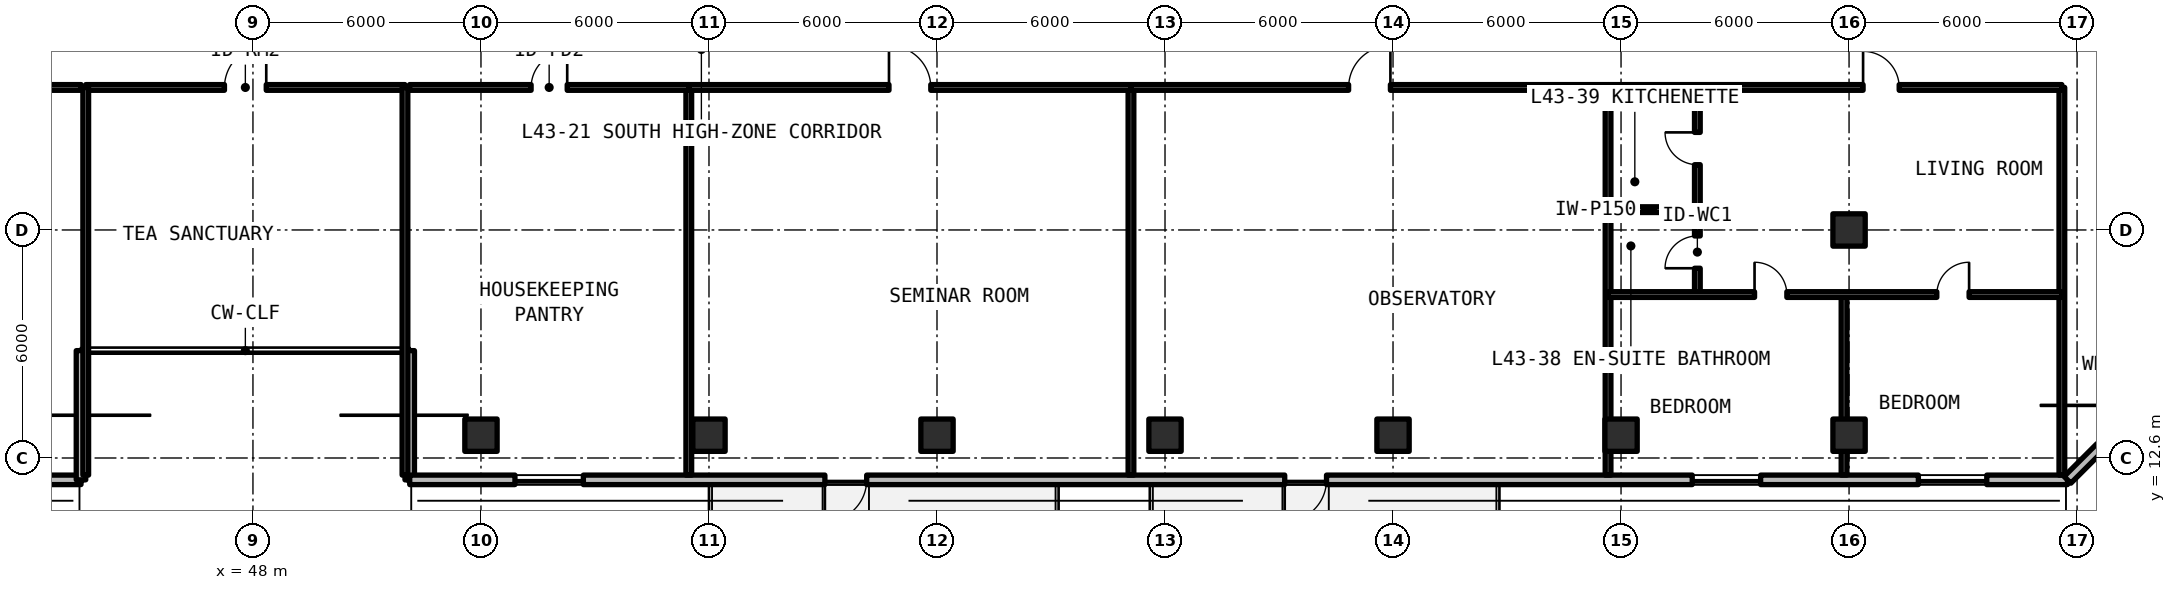
"""IFC4 building model, lengths in metres.
Left out: names, types, materials, properties, quantities, classifications, styles, units other than length and angle.
Written with IfcOpenShell. Run it as: python <this file> out.ifc"""

import sys

from ifc_helpers import new_model, si_unit, direction, frame, frame_2d, origin, origin_2d, place, context, subcontext, project, spatial, rectangle, extrude, element, fill, save


model = new_model("IFC4")
c1 = context("Model", 3, precision=1e-05, world=origin(), true_north=direction((0.0, 1.0)))
c2 = subcontext(c1, "Body", "Model", "MODEL_VIEW")
j1 = project(units=[si_unit("LENGTHUNIT", "METRE"), si_unit("PLANEANGLEUNIT", "RADIAN")], contexts=[c1])
p1 = place(None, origin())
s1 = spatial("IfcSite", under=j1, at=p1, CompositionType="ELEMENT")
p2 = place(p1, origin())
s2 = spatial("IfcBuilding", under=s1, at=p2, CompositionType="ELEMENT")
p3 = place(p2, frame((0.0, 0.0, 155.1)))
s3 = spatial("IfcBuildingStorey", under=s2, at=p3, CompositionType="ELEMENT", Elevation=155.1)
for number, where, z_axis, x_axis in (
    (1, (90.0, 18.6, 0.0), (0.0, 0.0, 1.0), (1.0, 0.0, 0.0)),
    (2, (54.0, 13.2, 0.0), (0.0, 0.0, 1.0), (1.0, 0.0, 0.0)),
    (3, (60.0, 13.2, 0.0), (0.0, 0.0, 1.0), (1.0, 0.0, 0.0)),
    (4, (66.0, 13.2, 0.0), (0.0, 0.0, 1.0), (1.0, 0.0, 0.0)),
    (5, (72.0, 13.2, 0.0), (0.0, 0.0, 1.0), (1.0, 0.0, 0.0)),
    (6, (78.0, 13.2, 0.0), (0.0, 0.0, 1.0), (1.0, 0.0, 0.0)),
    (7, (84.0, 13.2, 0.0), (0.0, 0.0, 1.0), (1.0, 0.0, 0.0)),
    (8, (90.0, 13.2, 0.0), (0.0, 0.0, 1.0), (1.0, 0.0, 0.0)),
):
    element("IfcColumn", number, at=place(p3, frame(where, z_axis=z_axis, x_axis=x_axis)), inside=s3, PredefinedType="COLUMN", context=c2, shape_type="SweptSolid", body=[
        extrude(rectangle(XDim=0.85, YDim=0.85, at=origin_2d()), origin(), (0.0, 0.0, 1.0), 3.3),
    ])
p4 = place(p3, frame((23.852, 12.025, 0.0), z_axis=(0.0, 0.0, 1.0), x_axis=(1.0, 0.0, 0.0)))
e9 = element("IfcWall", 9, at=p4, inside=s3, PredefinedType="SOLIDWALL", context=c2, shape_type="SweptSolid", body=[
    extrude(rectangle(XDim=19.623, YDim=0.25, at=frame_2d((9.812, 0.0))), origin(), (0.0, 0.0, 1.0), 3.08),
])
p5 = place(p4, frame((3.148, 0.0, 0.0)))
e10 = element("IfcOpeningElement", 10, at=p5, cuts=e9, PredefinedType="OPENING", context=c2, shape_type="SweptSolid", body=[
    extrude(rectangle(XDim=1.1, YDim=2.15, at=frame_2d((0.55, 1.075))), frame((0.0, 0.135, 0.0), z_axis=(0.0, -1.0, 0.0), x_axis=(1.0, 0.0, 0.0)), (0.0, 0.0, 1.0), 0.27),
])
p6 = place(p4, frame((14.024, 0.0, 0.78)))
e11 = element("IfcOpeningElement", 11, at=p6, cuts=e9, PredefinedType="OPENING", context=c2, shape_type="SweptSolid", body=[
    extrude(rectangle(XDim=1.8, YDim=1.66, at=frame_2d((0.9, 0.83))), frame((0.0, 0.135, 0.0), z_axis=(0.0, -1.0, 0.0), x_axis=(1.0, 0.0, 0.0)), (0.0, 0.0, 1.0), 0.27),
])
for number, where, z_axis, x_axis in (
    (12, (43.475, 12.025, 0.0), (0.0, 0.0, 1.0), (0.0, 1.0, 0.0)),
    (13, (52.125, 15.425, 0.0), (0.0, 0.0, 1.0), (0.0, -1.0, 0.0)),
):
    element("IfcWall", number, at=place(p3, frame(where, z_axis=z_axis, x_axis=x_axis)), inside=s3, PredefinedType="SOLIDWALL", context=c2, shape_type="SweptSolid", body=[
        extrude(rectangle(XDim=3.4, YDim=0.25, at=frame_2d((1.7, 0.0))), origin(), (0.0, 0.0, 1.0), 3.08),
    ])
p7 = place(p3, frame((52.125, 12.025, 0.0), z_axis=(0.0, 0.0, 1.0), x_axis=(1.0, 0.0, 0.0)))
e14 = element("IfcWall", 14, at=p7, inside=s3, PredefinedType="SOLIDWALL", context=c2, shape_type="SweptSolid", body=[
    extrude(rectangle(XDim=43.623, YDim=0.25, at=frame_2d((21.812, 0.0))), origin(), (0.0, 0.0, 1.0), 3.08),
])
p8 = place(p7, frame((10.925, 0.0, 0.0)))
e15 = element("IfcOpeningElement", 15, at=p8, cuts=e14, PredefinedType="OPENING", context=c2, shape_type="SweptSolid", body=[
    extrude(rectangle(XDim=1.1, YDim=2.15, at=frame_2d((0.55, 1.075))), frame((0.0, 0.135, 0.0), z_axis=(0.0, -1.0, 0.0), x_axis=(1.0, 0.0, 0.0)), (0.0, 0.0, 1.0), 0.27),
])
p9 = place(p7, frame((23.025, 0.0, 0.0)))
e16 = element("IfcOpeningElement", 16, at=p9, cuts=e14, PredefinedType="OPENING", context=c2, shape_type="SweptSolid", body=[
    extrude(rectangle(XDim=1.1, YDim=2.15, at=frame_2d((0.55, 1.075))), frame((0.0, 0.135, 0.0), z_axis=(0.0, -1.0, 0.0), x_axis=(1.0, 0.0, 0.0)), (0.0, 0.0, 1.0), 0.27),
])
p10 = place(p7, frame((2.769, 0.0, 0.78)))
e17 = element("IfcOpeningElement", 17, at=p10, cuts=e14, PredefinedType="OPENING", context=c2, shape_type="SweptSolid", body=[
    extrude(rectangle(XDim=1.8, YDim=1.66, at=frame_2d((0.9, 0.83))), frame((0.0, 0.135, 0.0), z_axis=(0.0, -1.0, 0.0), x_axis=(1.0, 0.0, 0.0)), (0.0, 0.0, 1.0), 0.27),
])
p11 = place(p7, frame((33.748, 0.0, 0.78)))
e18 = element("IfcOpeningElement", 18, at=p11, cuts=e14, PredefinedType="OPENING", context=c2, shape_type="SweptSolid", body=[
    extrude(rectangle(XDim=1.8, YDim=1.66, at=frame_2d((0.9, 0.83))), frame((0.0, 0.135, 0.0), z_axis=(0.0, -1.0, 0.0), x_axis=(1.0, 0.0, 0.0)), (0.0, 0.0, 1.0), 0.27),
])
p12 = place(p7, frame((39.699, 0.0, 0.78)))
e19 = element("IfcOpeningElement", 19, at=p12, cuts=e14, PredefinedType="OPENING", context=c2, shape_type="SweptSolid", body=[
    extrude(rectangle(XDim=1.8, YDim=1.66, at=frame_2d((0.9, 0.83))), frame((0.0, 0.135, 0.0), z_axis=(0.0, -1.0, 0.0), x_axis=(1.0, 0.0, 0.0)), (0.0, 0.0, 1.0), 0.27),
])
p13 = place(p3, frame((95.748, 12.025, 0.0), z_axis=(0.0, 0.0, 1.0), x_axis=(0.70708586489, 0.707127696864, 0.0)))
e20 = element("IfcWall", 20, at=p13, inside=s3, PredefinedType="SOLIDWALL", context=c2, shape_type="SweptSolid", body=[
    extrude(rectangle(XDim=5.836, YDim=0.25, at=frame_2d((2.918, 0.0))), origin(), (0.0, 0.0, 1.0), 3.08),
])
p14 = place(p13, frame((1.218, 0.0, 0.78)))
e21 = element("IfcOpeningElement", 21, at=p14, cuts=e20, PredefinedType="OPENING", context=c2, shape_type="SweptSolid", body=[
    extrude(rectangle(XDim=3.4, YDim=1.66, at=frame_2d((1.7, 0.83))), frame((0.0, 0.135, 0.0), z_axis=(0.0, -1.0, 0.0), x_axis=(1.0, 0.0, 0.0)), (0.0, 0.0, 1.0), 0.27),
])
p15 = place(p3, frame((43.6, 22.35, 0.0), z_axis=(0.0, 0.0, 1.0), x_axis=(1.0, 0.0, 0.0)))
e22 = element("IfcWall", 22, at=p15, inside=s3, PredefinedType="SOLIDWALL", context=c2, shape_type="SweptSolid", body=[
    extrude(rectangle(XDim=8.4, YDim=0.15, at=frame_2d((4.2, 0.0))), origin(), (0.0, 0.0, 1.0), 2.35),
])
p16 = place(p15, frame((3.65, 0.0, 0.0)))
e23 = element("IfcOpeningElement", 23, at=p16, cuts=e22, PredefinedType="OPENING", context=c2, shape_type="SweptSolid", body=[
    extrude(rectangle(XDim=1.1, YDim=2.15, at=frame_2d((0.55, 1.075))), frame((0.0, 0.085, 0.0), z_axis=(0.0, -1.0, 0.0), x_axis=(1.0, 0.0, 0.0)), (0.0, 0.0, 1.0), 0.17),
])
for number, where, z_axis, x_axis in (
    (24, (43.6, 12.15, 0.0), (0.0, 0.0, 1.0), (0.0, 1.0, 0.0)),
    (25, (52.0, 12.15, 0.0), (0.0, 0.0, 1.0), (0.0, 1.0, 0.0)),
):
    element("IfcWall", number, at=place(p3, frame(where, z_axis=z_axis, x_axis=x_axis)), inside=s3, PredefinedType="SOLIDWALL", context=c2, shape_type="SweptSolid", body=[
        extrude(rectangle(XDim=10.2, YDim=0.15, at=frame_2d((5.1, 0.0))), origin(), (0.0, 0.0, 1.0), 2.35),
    ])
p17 = place(p3, frame((34.072, 22.35, 0.0), z_axis=(0.0, 0.0, 1.0), x_axis=(1.0, 0.0, 0.0)))
e26 = element("IfcWall", 26, at=p17, inside=s3, PredefinedType="SOLIDWALL", context=c2, shape_type="SweptSolid", body=[
    extrude(rectangle(XDim=9.408, YDim=0.15, at=frame_2d((4.704, 0.0))), origin(), (0.0, 0.0, 1.0), 2.35),
])
p18 = place(p17, frame((4.154, 0.0, 0.0)))
e27 = element("IfcOpeningElement", 27, at=p18, cuts=e26, PredefinedType="OPENING", context=c2, shape_type="SweptSolid", body=[
    extrude(rectangle(XDim=1.1, YDim=2.15, at=frame_2d((0.55, 1.075))), frame((0.0, 0.085, 0.0), z_axis=(0.0, -1.0, 0.0), x_axis=(1.0, 0.0, 0.0)), (0.0, 0.0, 1.0), 0.17),
])
for number, where, z_axis, x_axis in (
    (28, (95.6, 12.15, 0.0), (0.0, 0.0, 1.0), (0.0, 1.0, 0.0)),
    (29, (59.469, 12.15, 0.0), (0.0, 0.0, 1.0), (0.0, 1.0, 0.0)),
):
    element("IfcWall", number, at=place(p3, frame(where, z_axis=z_axis, x_axis=x_axis)), inside=s3, PredefinedType="SOLIDWALL", context=c2, shape_type="SweptSolid", body=[
        extrude(rectangle(XDim=10.2, YDim=0.15, at=frame_2d((5.1, 0.0))), origin(), (0.0, 0.0, 1.0), 2.35),
    ])
p19 = place(p3, frame((52.12, 22.35, 0.0), z_axis=(0.0, 0.0, 1.0), x_axis=(1.0, 0.0, 0.0)))
e30 = element("IfcWall", 30, at=p19, inside=s3, PredefinedType="SOLIDWALL", context=c2, shape_type="SweptSolid", body=[
    extrude(rectangle(XDim=7.349, YDim=0.15, at=frame_2d((3.674, 0.0))), origin(), (0.0, 0.0, 1.0), 2.35),
])
p20 = place(p19, frame((3.199, 0.0, 0.0)))
e31 = element("IfcOpeningElement", 31, at=p20, cuts=e30, PredefinedType="OPENING", context=c2, shape_type="SweptSolid", body=[
    extrude(rectangle(XDim=0.95, YDim=2.15, at=frame_2d((0.475, 1.075))), frame((0.0, 0.085, 0.0), z_axis=(0.0, -1.0, 0.0), x_axis=(1.0, 0.0, 0.0)), (0.0, 0.0, 1.0), 0.17),
])
p21 = place(p3, frame((71.104, 12.15, 0.0), z_axis=(0.0, 0.0, 1.0), x_axis=(0.0, 1.0, 0.0)))
e32 = element("IfcWall", 32, at=p21, inside=s3, PredefinedType="SOLIDWALL", context=c2, shape_type="SweptSolid", body=[
    extrude(rectangle(XDim=10.2, YDim=0.15, at=frame_2d((5.1, 0.0))), origin(), (0.0, 0.0, 1.0), 2.35),
])
p22 = place(p3, frame((59.469, 22.35, 0.0), z_axis=(0.0, 0.0, 1.0), x_axis=(1.0, 0.0, 0.0)))
e33 = element("IfcWall", 33, at=p22, inside=s3, PredefinedType="SOLIDWALL", context=c2, shape_type="SweptSolid", body=[
    extrude(rectangle(XDim=11.635, YDim=0.15, at=frame_2d((5.818, 0.0))), origin(), (0.0, 0.0, 1.0), 2.35),
])
p23 = place(p22, frame((5.268, 0.0, 0.0)))
e34 = element("IfcOpeningElement", 34, at=p23, cuts=e33, PredefinedType="OPENING", context=c2, shape_type="SweptSolid", body=[
    extrude(rectangle(XDim=1.1, YDim=2.15, at=frame_2d((0.55, 1.075))), frame((0.0, 0.085, 0.0), z_axis=(0.0, -1.0, 0.0), x_axis=(1.0, 0.0, 0.0)), (0.0, 0.0, 1.0), 0.17),
])
p24 = place(p3, frame((83.658, 12.15, 0.0), z_axis=(0.0, 0.0, 1.0), x_axis=(0.0, 1.0, 0.0)))
e35 = element("IfcWall", 35, at=p24, inside=s3, PredefinedType="SOLIDWALL", context=c2, shape_type="SweptSolid", body=[
    extrude(rectangle(XDim=10.2, YDim=0.15, at=frame_2d((5.1, 0.0))), origin(), (0.0, 0.0, 1.0), 2.35),
])
p25 = place(p3, frame((71.104, 22.35, 0.0), z_axis=(0.0, 0.0, 1.0), x_axis=(1.0, 0.0, 0.0)))
e36 = element("IfcWall", 36, at=p25, inside=s3, PredefinedType="SOLIDWALL", context=c2, shape_type="SweptSolid", body=[
    extrude(rectangle(XDim=12.554, YDim=0.15, at=frame_2d((6.277, 0.0))), origin(), (0.0, 0.0, 1.0), 2.35),
])
p26 = place(p25, frame((5.727, 0.0, 0.0)))
e37 = element("IfcOpeningElement", 37, at=p26, cuts=e36, PredefinedType="OPENING", context=c2, shape_type="SweptSolid", body=[
    extrude(rectangle(XDim=1.1, YDim=2.15, at=frame_2d((0.55, 1.075))), frame((0.0, 0.085, 0.0), z_axis=(0.0, -1.0, 0.0), x_axis=(1.0, 0.0, 0.0)), (0.0, 0.0, 1.0), 0.17),
])
p27 = place(p3, frame((83.658, 19.135, 0.0), z_axis=(0.0, 0.0, 1.0), x_axis=(1.0, 0.0, 0.0)))
e38 = element("IfcWall", 38, at=p27, inside=s3, PredefinedType="PARTITIONING", context=c2, shape_type="SweptSolid", body=[
    extrude(rectangle(XDim=2.35, YDim=0.15, at=frame_2d((1.175, 0.0))), origin(), (0.0, 0.0, 1.0), 2.35),
])
p28 = place(p3, frame((86.008, 16.901, 0.0), z_axis=(0.0, 0.0, 1.0), x_axis=(0.0, 1.0, 0.0)))
e39 = element("IfcWall", 39, at=p28, inside=s3, PredefinedType="PARTITIONING", context=c2, shape_type="SweptSolid", body=[
    extrude(rectangle(XDim=5.449, YDim=0.15, at=frame_2d((2.725, 0.0))), origin(), (0.0, 0.0, 1.0), 2.35),
])
p29 = place(p28, frame((0.692, 0.0, 0.0)))
e40 = element("IfcOpeningElement", 40, at=p29, cuts=e39, PredefinedType="OPENING", context=c2, shape_type="SweptSolid", body=[
    extrude(rectangle(XDim=0.85, YDim=2.1, at=frame_2d((0.425, 1.05))), frame((0.0, 0.085, 0.0), z_axis=(0.0, -1.0, 0.0), x_axis=(1.0, 0.0, 0.0)), (0.0, 0.0, 1.0), 0.17),
])
p30 = place(p28, frame((3.417, 0.0, 0.0)))
e41 = element("IfcOpeningElement", 41, at=p30, cuts=e39, PredefinedType="OPENING", context=c2, shape_type="SweptSolid", body=[
    extrude(rectangle(XDim=0.85, YDim=2.1, at=frame_2d((0.425, 1.05))), frame((0.0, 0.085, 0.0), z_axis=(0.0, -1.0, 0.0), x_axis=(1.0, 0.0, 0.0)), (0.0, 0.0, 1.0), 0.17),
])
p31 = place(p3, frame((89.868, 12.15, 0.0), z_axis=(0.0, 0.0, 1.0), x_axis=(0.0, 1.0, 0.0)))
e42 = element("IfcWall", 42, at=p31, inside=s3, PredefinedType="PARTITIONING", context=c2, shape_type="SweptSolid", body=[
    extrude(rectangle(XDim=4.751, YDim=0.15, at=frame_2d((2.375, 0.0))), origin(), (0.0, 0.0, 1.0), 2.35),
])
p32 = place(p3, frame((83.658, 16.901, 0.0), z_axis=(0.0, 0.0, 1.0), x_axis=(1.0, 0.0, 0.0)))
e43 = element("IfcWall", 43, at=p32, inside=s3, PredefinedType="PARTITIONING", context=c2, shape_type="SweptSolid", body=[
    extrude(rectangle(XDim=11.942, YDim=0.15, at=frame_2d((5.971, 0.0))), origin(), (0.0, 0.0, 1.0), 2.35),
])
p33 = place(p32, frame((3.855, 0.0, 0.0)))
e44 = element("IfcOpeningElement", 44, at=p33, cuts=e43, PredefinedType="OPENING", context=c2, shape_type="SweptSolid", body=[
    extrude(rectangle(XDim=0.85, YDim=2.1, at=frame_2d((0.425, 1.05))), frame((0.0, 0.085, 0.0), z_axis=(0.0, -1.0, 0.0), x_axis=(1.0, 0.0, 0.0)), (0.0, 0.0, 1.0), 0.17),
])
p34 = place(p32, frame((8.651, 0.0, 0.0)))
e45 = element("IfcOpeningElement", 45, at=p34, cuts=e43, PredefinedType="OPENING", context=c2, shape_type="SweptSolid", body=[
    extrude(rectangle(XDim=0.85, YDim=2.1, at=frame_2d((0.425, 1.05))), frame((0.0, 0.085, 0.0), z_axis=(0.0, -1.0, 0.0), x_axis=(1.0, 0.0, 0.0)), (0.0, 0.0, 1.0), 0.17),
])
p35 = place(p3, frame((83.658, 22.35, 0.0), z_axis=(0.0, 0.0, 1.0), x_axis=(1.0, 0.0, 0.0)))
e46 = element("IfcWall", 46, at=p35, inside=s3, PredefinedType="SOLIDWALL", context=c2, shape_type="SweptSolid", body=[
    extrude(rectangle(XDim=11.942, YDim=0.15, at=frame_2d((5.971, 0.0))), origin(), (0.0, 0.0, 1.0), 2.35),
])
p36 = place(p35, frame((6.711, 0.0, 0.0)))
e47 = element("IfcOpeningElement", 47, at=p36, cuts=e46, PredefinedType="OPENING", context=c2, shape_type="SweptSolid", body=[
    extrude(rectangle(XDim=0.95, YDim=2.15, at=frame_2d((0.475, 1.075))), frame((0.0, 0.085, 0.0), z_axis=(0.0, -1.0, 0.0), x_axis=(1.0, 0.0, 0.0)), (0.0, 0.0, 1.0), 0.17),
])
p37 = place(p8, frame((1.1, 0.0, 0.0), z_axis=(0.0, 0.0, 1.0), x_axis=(-1.0, 0.0, 0.0)))
e48 = element("IfcDoor", 48, at=p37, inside=s3, OperationType="SINGLE_SWING_LEFT", PredefinedType="DOOR", context=c2, shape_type="SweptSolid", body=[
    extrude(rectangle(XDim=1.1, YDim=2.15, at=frame_2d((0.55, 1.075))), frame((0.0, 0.025, 0.0), z_axis=(0.0, -1.0, 0.0), x_axis=(1.0, 0.0, 0.0)), (0.0, 0.0, 1.0), 0.05),
])
fill(e15, e48)
p38 = place(p9, frame((1.1, 0.0, 0.0), z_axis=(0.0, 0.0, 1.0), x_axis=(-1.0, 0.0, 0.0)))
e49 = element("IfcDoor", 49, at=p38, inside=s3, OperationType="SINGLE_SWING_RIGHT", PredefinedType="DOOR", context=c2, shape_type="SweptSolid", body=[
    extrude(rectangle(XDim=1.1, YDim=2.15, at=frame_2d((0.55, 1.075))), frame((0.0, 0.025, 0.0), z_axis=(0.0, -1.0, 0.0), x_axis=(1.0, 0.0, 0.0)), (0.0, 0.0, 1.0), 0.05),
])
fill(e16, e49)
p39 = place(p10, origin())
e50 = element("IfcWindow", 50, at=p39, inside=s3, PartitioningType="SINGLE_PANEL", PredefinedType="WINDOW", context=c2, shape_type="SweptSolid", body=[
    extrude(rectangle(XDim=1.8, YDim=1.66, at=frame_2d((0.9, 0.83))), frame((0.0, 0.03, 0.0), z_axis=(0.0, -1.0, 0.0), x_axis=(1.0, 0.0, 0.0)), (0.0, 0.0, 1.0), 0.06),
])
fill(e17, e50)
p40 = place(p11, origin())
e51 = element("IfcWindow", 51, at=p40, inside=s3, PartitioningType="SINGLE_PANEL", PredefinedType="WINDOW", context=c2, shape_type="SweptSolid", body=[
    extrude(rectangle(XDim=1.8, YDim=1.66, at=frame_2d((0.9, 0.83))), frame((0.0, 0.03, 0.0), z_axis=(0.0, -1.0, 0.0), x_axis=(1.0, 0.0, 0.0)), (0.0, 0.0, 1.0), 0.06),
])
fill(e18, e51)
p41 = place(p12, origin())
e52 = element("IfcWindow", 52, at=p41, inside=s3, PartitioningType="SINGLE_PANEL", PredefinedType="WINDOW", context=c2, shape_type="SweptSolid", body=[
    extrude(rectangle(XDim=1.8, YDim=1.66, at=frame_2d((0.9, 0.83))), frame((0.0, 0.03, 0.0), z_axis=(0.0, -1.0, 0.0), x_axis=(1.0, 0.0, 0.0)), (0.0, 0.0, 1.0), 0.06),
])
fill(e19, e52)
p42 = place(p16, origin())
e53 = element("IfcDoor", 53, at=p42, inside=s3, OperationType="SINGLE_SWING_RIGHT", PredefinedType="DOOR", context=c2, shape_type="SweptSolid", body=[
    extrude(rectangle(XDim=1.1, YDim=2.15, at=frame_2d((0.55, 1.075))), frame((0.0, 0.025, 0.0), z_axis=(0.0, -1.0, 0.0), x_axis=(1.0, 0.0, 0.0)), (0.0, 0.0, 1.0), 0.05),
])
fill(e23, e53)
p43 = place(p20, origin())
e54 = element("IfcDoor", 54, at=p43, inside=s3, OperationType="SINGLE_SWING_RIGHT", PredefinedType="DOOR", context=c2, shape_type="SweptSolid", body=[
    extrude(rectangle(XDim=0.95, YDim=2.15, at=frame_2d((0.475, 1.075))), frame((0.0, 0.025, 0.0), z_axis=(0.0, -1.0, 0.0), x_axis=(1.0, 0.0, 0.0)), (0.0, 0.0, 1.0), 0.05),
])
fill(e31, e54)
p44 = place(p23, origin())
e55 = element("IfcDoor", 55, at=p44, inside=s3, OperationType="SINGLE_SWING_LEFT", PredefinedType="DOOR", context=c2, shape_type="SweptSolid", body=[
    extrude(rectangle(XDim=1.1, YDim=2.15, at=frame_2d((0.55, 1.075))), frame((0.0, 0.025, 0.0), z_axis=(0.0, -1.0, 0.0), x_axis=(1.0, 0.0, 0.0)), (0.0, 0.0, 1.0), 0.05),
])
fill(e34, e55)
p45 = place(p26, origin())
e56 = element("IfcDoor", 56, at=p45, inside=s3, OperationType="SINGLE_SWING_RIGHT", PredefinedType="DOOR", context=c2, shape_type="SweptSolid", body=[
    extrude(rectangle(XDim=1.1, YDim=2.15, at=frame_2d((0.55, 1.075))), frame((0.0, 0.025, 0.0), z_axis=(0.0, -1.0, 0.0), x_axis=(1.0, 0.0, 0.0)), (0.0, 0.0, 1.0), 0.05),
])
fill(e37, e56)
p46 = place(p29, origin())
e57 = element("IfcDoor", 57, at=p46, inside=s3, OperationType="SINGLE_SWING_LEFT", PredefinedType="DOOR", context=c2, shape_type="SweptSolid", body=[
    extrude(rectangle(XDim=0.85, YDim=2.1, at=frame_2d((0.425, 1.05))), frame((0.0, 0.025, 0.0), z_axis=(0.0, -1.0, 0.0), x_axis=(1.0, 0.0, 0.0)), (0.0, 0.0, 1.0), 0.05),
])
fill(e40, e57)
p47 = place(p30, origin())
e58 = element("IfcDoor", 58, at=p47, inside=s3, OperationType="SINGLE_SWING_RIGHT", PredefinedType="DOOR", context=c2, shape_type="SweptSolid", body=[
    extrude(rectangle(XDim=0.85, YDim=2.1, at=frame_2d((0.425, 1.05))), frame((0.0, 0.025, 0.0), z_axis=(0.0, -1.0, 0.0), x_axis=(1.0, 0.0, 0.0)), (0.0, 0.0, 1.0), 0.05),
])
fill(e41, e58)
p48 = place(p33, origin())
e59 = element("IfcDoor", 59, at=p48, inside=s3, OperationType="SINGLE_SWING_LEFT", PredefinedType="DOOR", context=c2, shape_type="SweptSolid", body=[
    extrude(rectangle(XDim=0.85, YDim=2.1, at=frame_2d((0.425, 1.05))), frame((0.0, 0.025, 0.0), z_axis=(0.0, -1.0, 0.0), x_axis=(1.0, 0.0, 0.0)), (0.0, 0.0, 1.0), 0.05),
])
fill(e44, e59)
p49 = place(p34, origin())
e60 = element("IfcDoor", 60, at=p49, inside=s3, OperationType="SINGLE_SWING_RIGHT", PredefinedType="DOOR", context=c2, shape_type="SweptSolid", body=[
    extrude(rectangle(XDim=0.85, YDim=2.1, at=frame_2d((0.425, 1.05))), frame((0.0, 0.025, 0.0), z_axis=(0.0, -1.0, 0.0), x_axis=(1.0, 0.0, 0.0)), (0.0, 0.0, 1.0), 0.05),
])
fill(e45, e60)
p50 = place(p36, origin())
e61 = element("IfcDoor", 61, at=p50, inside=s3, OperationType="SINGLE_SWING_LEFT", PredefinedType="DOOR", context=c2, shape_type="SweptSolid", body=[
    extrude(rectangle(XDim=0.95, YDim=2.15, at=frame_2d((0.475, 1.075))), frame((0.0, 0.025, 0.0), z_axis=(0.0, -1.0, 0.0), x_axis=(1.0, 0.0, 0.0)), (0.0, 0.0, 1.0), 0.05),
])
fill(e47, e61)
save(model, sys.argv[1])
